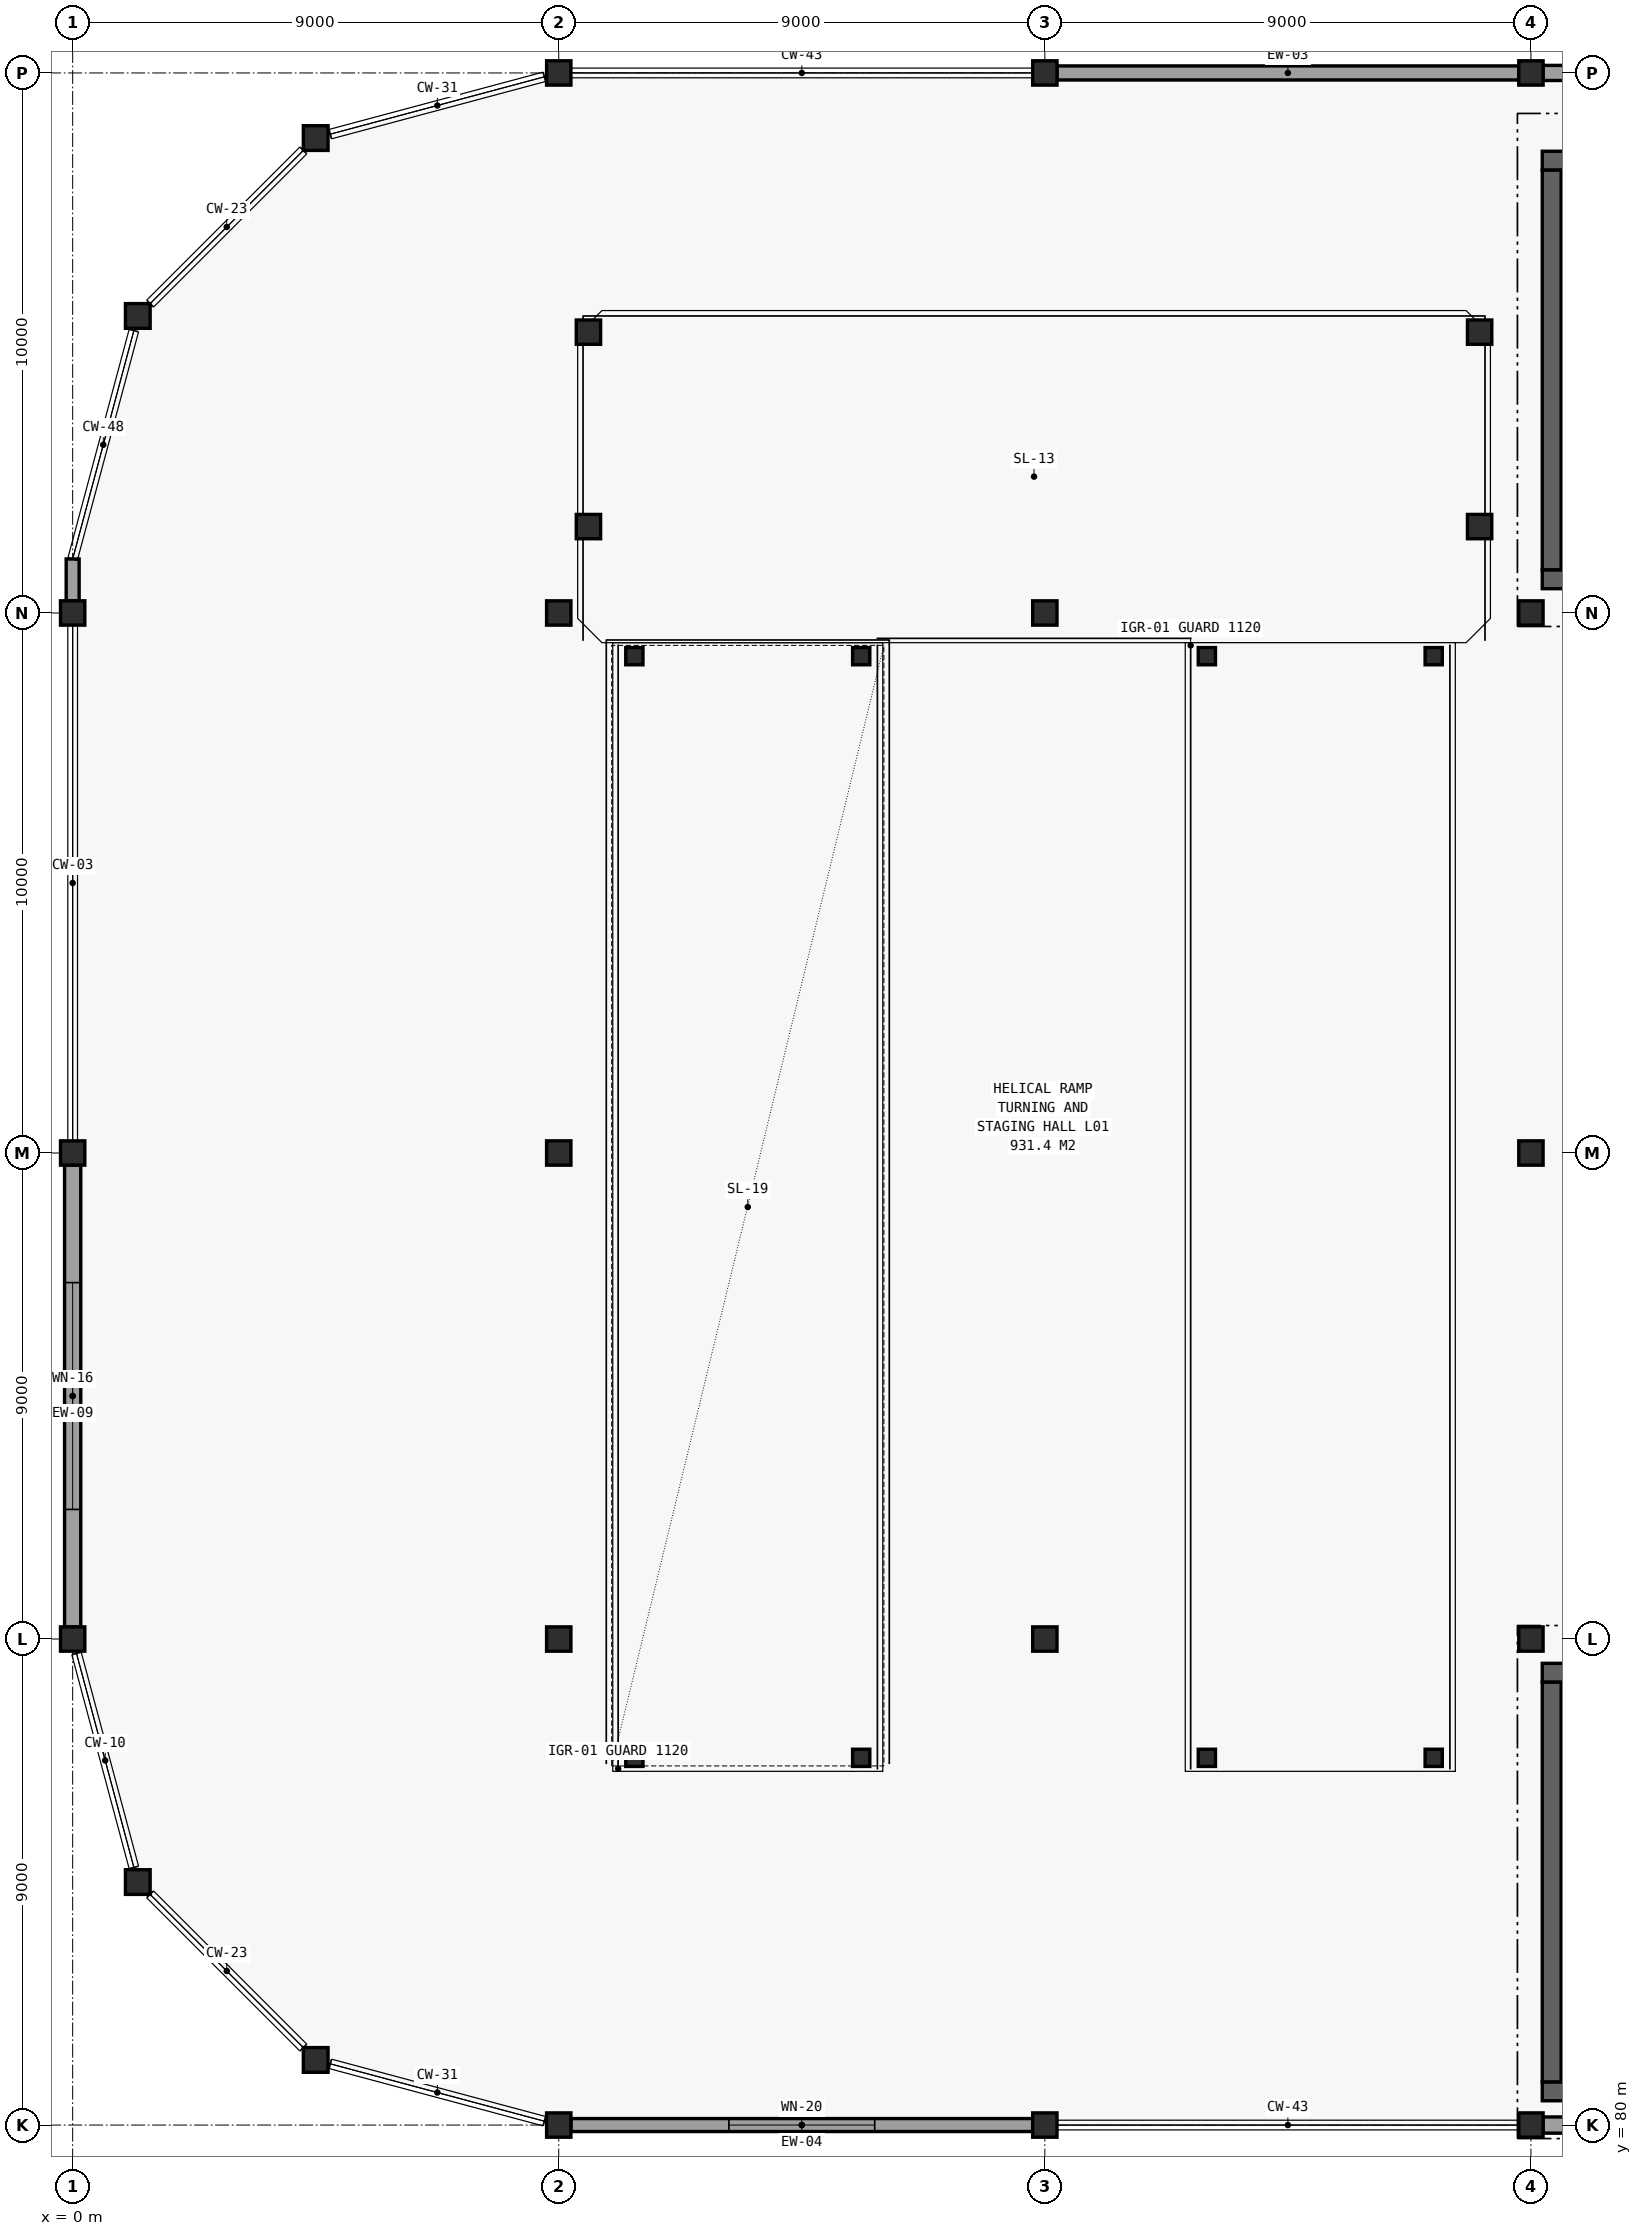
"""IFC4 building model, lengths in metres.
Left out: names, types, materials, properties, quantities, classifications, styles, units other than length and angle.
Written with IfcOpenShell. Run it as: python <this file> out.ifc"""

import sys

from ifc_helpers import new_model, si_unit, direction, frame, frame_2d, origin, origin_2d, place, context, subcontext, project, spatial, rectangle, hollow_rectangle, hollow_circle, extrude, element, fill, save


model = new_model("IFC4")
c1 = context("Model", 3, precision=1e-05, world=origin(), true_north=direction((0.0, 1.0)))
c2 = subcontext(c1, "Body", "Model", "MODEL_VIEW")
j1 = project(units=[si_unit("LENGTHUNIT", "METRE"), si_unit("PLANEANGLEUNIT", "RADIAN")], contexts=[c1])
p1 = place(None, origin())
s1 = spatial("IfcSite", under=j1, at=p1, CompositionType="ELEMENT")
p2 = place(p1, origin())
s2 = spatial("IfcBuilding", under=s1, at=p2, CompositionType="ELEMENT")
p3 = place(p2, frame((0.0, 0.0, 5.1)))
s3 = spatial("IfcBuildingStorey", under=s2, at=p3, CompositionType="ELEMENT", Elevation=5.1)
for number, where, z_axis, x_axis in (
    (1, (0.0, 89.0, 0.0), (0.0, 0.0, 1.0), (1.0, 0.0, 0.0)),
    (2, (0.0, 98.0, 0.0), (0.0, 0.0, 1.0), (1.0, 0.0, 0.0)),
    (3, (0.0, 108.0, 0.0), (0.0, 0.0, 1.0), (1.0, 0.0, 0.0)),
):
    element("IfcColumn", number, at=place(p3, frame(where, z_axis=z_axis, x_axis=x_axis)), inside=s3, PredefinedType="COLUMN", context=c2, shape_type="SweptSolid", body=[
        extrude(hollow_rectangle(XDim=0.45, YDim=0.45, WallThickness=0.022, at=origin_2d()), origin(), (0.0, 0.0, 1.0), 4.2),
    ])
for number, where, z_axis, x_axis in (
    (4, (1.206, 84.5, 0.0), (0.0, 0.0, 1.0), (1.0, 0.0, 0.0)),
    (5, (1.206, 113.5, 0.0), (0.0, 0.0, 1.0), (1.0, 0.0, 0.0)),
    (6, (4.5, 81.206, 0.0), (0.0, 0.0, 1.0), (1.0, 0.0, 0.0)),
    (7, (4.5, 116.794, 0.0), (0.0, 0.0, 1.0), (1.0, 0.0, 0.0)),
):
    element("IfcColumn", number, at=place(p3, frame(where, z_axis=z_axis, x_axis=x_axis)), inside=s3, PredefinedType="COLUMN", context=c2, shape_type="SweptSolid", body=[
        extrude(hollow_circle(Radius=0.229, WallThickness=0.016, at=origin_2d()), origin(), (0.0, 0.0, 1.0), 4.2),
    ])
for number, where, z_axis, x_axis in (
    (8, (9.0, 80.0, 0.0), (0.0, 0.0, 1.0), (1.0, 0.0, 0.0)),
    (9, (9.0, 89.0, 0.0), (0.0, 0.0, 1.0), (1.0, 0.0, 0.0)),
    (10, (9.0, 98.0, 0.0), (0.0, 0.0, 1.0), (1.0, 0.0, 0.0)),
    (11, (9.0, 108.0, 0.0), (0.0, 0.0, 1.0), (1.0, 0.0, 0.0)),
    (12, (9.0, 118.0, 0.0), (0.0, 0.0, 1.0), (1.0, 0.0, 0.0)),
    (13, (9.55, 109.6, 0.0), (0.0, 0.0, 1.0), (1.0, 0.0, 0.0)),
    (14, (9.55, 113.2, 0.0), (0.0, 0.0, 1.0), (1.0, 0.0, 0.0)),
):
    element("IfcColumn", number, at=place(p3, frame(where, z_axis=z_axis, x_axis=x_axis)), inside=s3, PredefinedType="COLUMN", context=c2, shape_type="SweptSolid", body=[
        extrude(hollow_rectangle(XDim=0.45, YDim=0.45, WallThickness=0.022, at=origin_2d()), origin(), (0.0, 0.0, 1.0), 4.2),
    ])
for number, where, z_axis, x_axis in (
    (15, (10.4, 86.8, 0.0), (0.0, 0.0, 1.0), (1.0, 0.0, 0.0)),
    (16, (10.4, 107.2, 0.0), (0.0, 0.0, 1.0), (1.0, 0.0, 0.0)),
    (17, (14.6, 86.8, 0.0), (0.0, 0.0, 1.0), (1.0, 0.0, 0.0)),
    (18, (14.6, 107.2, 0.0), (0.0, 0.0, 1.0), (1.0, 0.0, 0.0)),
):
    element("IfcColumn", number, at=place(p3, frame(where, z_axis=z_axis, x_axis=x_axis)), inside=s3, PredefinedType="COLUMN", context=c2, shape_type="SweptSolid", body=[
        extrude(hollow_circle(Radius=0.159, WallThickness=0.01, at=origin_2d()), origin(), (0.0, 0.0, 1.0), 4.2),
    ])
for number, where, z_axis, x_axis in (
    (19, (18.0, 80.0, 0.0), (0.0, 0.0, 1.0), (1.0, 0.0, 0.0)),
    (20, (18.0, 89.0, 0.0), (0.0, 0.0, 1.0), (1.0, 0.0, 0.0)),
    (21, (18.0, 108.0, 0.0), (0.0, 0.0, 1.0), (1.0, 0.0, 0.0)),
    (22, (18.0, 118.0, 0.0), (0.0, 0.0, 1.0), (1.0, 0.0, 0.0)),
):
    element("IfcColumn", number, at=place(p3, frame(where, z_axis=z_axis, x_axis=x_axis)), inside=s3, PredefinedType="COLUMN", context=c2, shape_type="SweptSolid", body=[
        extrude(hollow_rectangle(XDim=0.45, YDim=0.45, WallThickness=0.022, at=origin_2d()), origin(), (0.0, 0.0, 1.0), 4.2),
    ])
for number, where, z_axis, x_axis in (
    (23, (21.0, 86.8, 0.0), (0.0, 0.0, 1.0), (1.0, 0.0, 0.0)),
    (24, (21.0, 107.2, 0.0), (0.0, 0.0, 1.0), (1.0, 0.0, 0.0)),
    (25, (25.2, 86.8, 0.0), (0.0, 0.0, 1.0), (1.0, 0.0, 0.0)),
    (26, (25.2, 107.2, 0.0), (0.0, 0.0, 1.0), (1.0, 0.0, 0.0)),
):
    element("IfcColumn", number, at=place(p3, frame(where, z_axis=z_axis, x_axis=x_axis)), inside=s3, PredefinedType="COLUMN", context=c2, shape_type="SweptSolid", body=[
        extrude(hollow_circle(Radius=0.159, WallThickness=0.01, at=origin_2d()), origin(), (0.0, 0.0, 1.0), 4.2),
    ])
for number, where, z_axis, x_axis in (
    (27, (26.05, 109.6, 0.0), (0.0, 0.0, 1.0), (1.0, 0.0, 0.0)),
    (28, (26.05, 113.2, 0.0), (0.0, 0.0, 1.0), (1.0, 0.0, 0.0)),
    (29, (27.0, 80.0, 0.0), (0.0, 0.0, 1.0), (1.0, 0.0, 0.0)),
    (30, (27.0, 89.0, 0.0), (0.0, 0.0, 1.0), (1.0, 0.0, 0.0)),
    (31, (27.0, 98.0, 0.0), (0.0, 0.0, 1.0), (1.0, 0.0, 0.0)),
    (32, (27.0, 108.0, 0.0), (0.0, 0.0, 1.0), (1.0, 0.0, 0.0)),
    (33, (27.0, 118.0, 0.0), (0.0, 0.0, 1.0), (1.0, 0.0, 0.0)),
):
    element("IfcColumn", number, at=place(p3, frame(where, z_axis=z_axis, x_axis=x_axis)), inside=s3, PredefinedType="COLUMN", context=c2, shape_type="SweptSolid", body=[
        extrude(hollow_rectangle(XDim=0.45, YDim=0.45, WallThickness=0.022, at=origin_2d()), origin(), (0.0, 0.0, 1.0), 4.2),
    ])
p4 = place(p3, frame((9.225, 80.0, 0.0), z_axis=(0.0, 0.0, 1.0), x_axis=(1.0, 0.0, 0.0)))
e34 = element("IfcWall", 34, at=p4, inside=s3, PredefinedType="SOLIDWALL", context=c2, shape_type="SweptSolid", body=[
    extrude(rectangle(XDim=8.55, YDim=0.24, at=frame_2d((4.275, 0.0))), origin(), (0.0, 0.0, 1.0), 3.29),
])
p5 = place(p4, frame((2.925, 0.0, 0.95)))
e35 = element("IfcOpeningElement", 35, at=p5, cuts=e34, PredefinedType="OPENING", context=c2, shape_type="SweptSolid", body=[
    extrude(rectangle(XDim=2.7, YDim=1.4, at=frame_2d((1.35, 0.7))), frame((0.0, 0.131, 0.0), z_axis=(0.0, -1.0, 0.0), x_axis=(1.0, 0.0, 0.0)), (0.0, 0.0, 1.0), 0.262),
])
p6 = place(p3, frame((27.225, 80.0, 0.0), z_axis=(0.0, 0.0, 1.0), x_axis=(1.0, 0.0, 0.0)))
e36 = element("IfcWall", 36, at=p6, inside=s3, PredefinedType="SOLIDWALL", context=c2, shape_type="SweptSolid", body=[
    extrude(rectangle(XDim=8.55, YDim=0.3, at=frame_2d((4.275, 0.0))), origin(), (0.0, 0.0, 1.0), 3.29),
])
p7 = place(p6, frame((3.075, 0.0, 0.95)))
e37 = element("IfcOpeningElement", 37, at=p7, cuts=e36, PredefinedType="OPENING", context=c2, shape_type="SweptSolid", body=[
    extrude(rectangle(XDim=2.4, YDim=1.3, at=frame_2d((1.2, 0.65))), frame((0.0, 0.161, 0.0), z_axis=(0.0, -1.0, 0.0), x_axis=(1.0, 0.0, 0.0)), (0.0, 0.0, 1.0), 0.322),
])
p8 = place(p3, frame((35.775, 118.0, 0.0), z_axis=(0.0, 0.0, 1.0), x_axis=(-1.0, 0.0, 0.0)))
e38 = element("IfcWall", 38, at=p8, inside=s3, PredefinedType="SOLIDWALL", context=c2, shape_type="SweptSolid", body=[
    extrude(rectangle(XDim=8.55, YDim=0.28, at=frame_2d((4.275, 0.0))), origin(), (0.0, 0.0, 1.0), 3.29),
])
p9 = place(p8, frame((3.225, 0.0, 0.95)))
e39 = element("IfcOpeningElement", 39, at=p9, cuts=e38, PredefinedType="OPENING", context=c2, shape_type="SweptSolid", body=[
    extrude(rectangle(XDim=2.1, YDim=1.3, at=frame_2d((1.05, 0.65))), frame((0.0, 0.151, 0.0), z_axis=(0.0, -1.0, 0.0), x_axis=(1.0, 0.0, 0.0)), (0.0, 0.0, 1.0), 0.302),
])
p10 = place(p3, frame((26.775, 118.0, 0.0), z_axis=(0.0, 0.0, 1.0), x_axis=(-1.0, 0.0, 0.0)))
e40 = element("IfcWall", 40, at=p10, inside=s3, PredefinedType="SOLIDWALL", context=c2, shape_type="SweptSolid", body=[
    extrude(rectangle(XDim=8.55, YDim=0.26, at=frame_2d((4.275, 0.0))), origin(), (0.0, 0.0, 1.0), 3.29),
])
p11 = place(p3, frame((0.0, 109.0, 0.0), z_axis=(0.0, 0.0, 1.0), x_axis=(0.0, -1.0, 0.0)))
e41 = element("IfcWall", 41, at=p11, inside=s3, PredefinedType="SOLIDWALL", context=c2, shape_type="SweptSolid", body=[
    extrude(rectangle(XDim=0.775, YDim=0.24, at=frame_2d((0.387, 0.0))), origin(), (0.0, 0.0, 1.0), 3.94),
])
p12 = place(p3, frame((0.0, 97.775, 0.0), z_axis=(0.0, 0.0, 1.0), x_axis=(0.0, -1.0, 0.0)))
e42 = element("IfcWall", 42, at=p12, inside=s3, PredefinedType="SOLIDWALL", context=c2, shape_type="SweptSolid", body=[
    extrude(rectangle(XDim=8.55, YDim=0.3, at=frame_2d((4.275, 0.0))), origin(), (0.0, 0.0, 1.0), 3.55),
])
p13 = place(p12, frame((2.175, 0.0, 0.95)))
e43 = element("IfcOpeningElement", 43, at=p13, cuts=e42, PredefinedType="OPENING", context=c2, shape_type="SweptSolid", body=[
    extrude(rectangle(XDim=4.2, YDim=2.1, at=frame_2d((2.1, 1.05))), frame((0.0, 0.161, 0.0), z_axis=(0.0, -1.0, 0.0), x_axis=(1.0, 0.0, 0.0)), (0.0, 0.0, 1.0), 0.322),
])
for number, where, z_axis, x_axis in (
    (44, (27.21, 80.625, 0.0), (0.0, 0.0, 1.0), (1.0, 0.0, 0.0)),
    (45, (27.21, 88.375, 0.0), (0.0, 0.0, 1.0), (1.0, 0.0, 0.0)),
):
    element("IfcWall", number, at=place(p3, frame(where, z_axis=z_axis, x_axis=x_axis)), inside=s3, PredefinedType="SHEAR", context=c2, shape_type="SweptSolid", body=[
        extrude(rectangle(XDim=3.98, YDim=0.35, at=frame_2d((1.99, 0.0))), origin(), (0.0, 0.0, 1.0), 3.94),
    ])
p14 = place(p3, frame((27.385, 80.8, 0.0), z_axis=(0.0, 0.0, 1.0), x_axis=(0.0, 1.0, 0.0)))
e46 = element("IfcWall", 46, at=p14, inside=s3, PredefinedType="SHEAR", context=c2, shape_type="SweptSolid", body=[
    extrude(rectangle(XDim=7.4, YDim=0.35, at=frame_2d((3.7, 0.0))), origin(), (0.0, 0.0, 1.0), 3.94),
])
for number, where, z_axis, x_axis in (
    (47, (27.21, 108.625, 0.0), (0.0, 0.0, 1.0), (1.0, 0.0, 0.0)),
    (48, (27.21, 116.375, 0.0), (0.0, 0.0, 1.0), (1.0, 0.0, 0.0)),
):
    element("IfcWall", number, at=place(p3, frame(where, z_axis=z_axis, x_axis=x_axis)), inside=s3, PredefinedType="SHEAR", context=c2, shape_type="SweptSolid", body=[
        extrude(rectangle(XDim=3.98, YDim=0.35, at=frame_2d((1.99, 0.0))), origin(), (0.0, 0.0, 1.0), 3.94),
    ])
p15 = place(p3, frame((27.385, 108.8, 0.0), z_axis=(0.0, 0.0, 1.0), x_axis=(0.0, 1.0, 0.0)))
e49 = element("IfcWall", 49, at=p15, inside=s3, PredefinedType="SHEAR", context=c2, shape_type="SweptSolid", body=[
    extrude(rectangle(XDim=7.4, YDim=0.35, at=frame_2d((3.7, 0.0))), origin(), (0.0, 0.0, 1.0), 3.94),
])
p16 = place(p5, origin())
e50 = element("IfcWindow", 50, at=p16, inside=s3, PartitioningType="SINGLE_PANEL", PredefinedType="WINDOW", context=c2, shape_type="SweptSolid", body=[
    extrude(rectangle(XDim=2.7, YDim=1.4, at=frame_2d((1.35, 0.7))), frame((0.0, 0.03, 0.0), z_axis=(0.0, -1.0, 0.0), x_axis=(1.0, 0.0, 0.0)), (0.0, 0.0, 1.0), 0.06),
])
fill(e35, e50)
p17 = place(p13, origin())
e51 = element("IfcWindow", 51, at=p17, inside=s3, PartitioningType="SINGLE_PANEL", PredefinedType="WINDOW", context=c2, shape_type="SweptSolid", body=[
    extrude(rectangle(XDim=4.2, YDim=2.1, at=frame_2d((2.1, 1.05))), frame((0.0, 0.03, 0.0), z_axis=(0.0, -1.0, 0.0), x_axis=(1.0, 0.0, 0.0)), (0.0, 0.0, 1.0), 0.06),
])
fill(e43, e51)
save(model, sys.argv[1])
